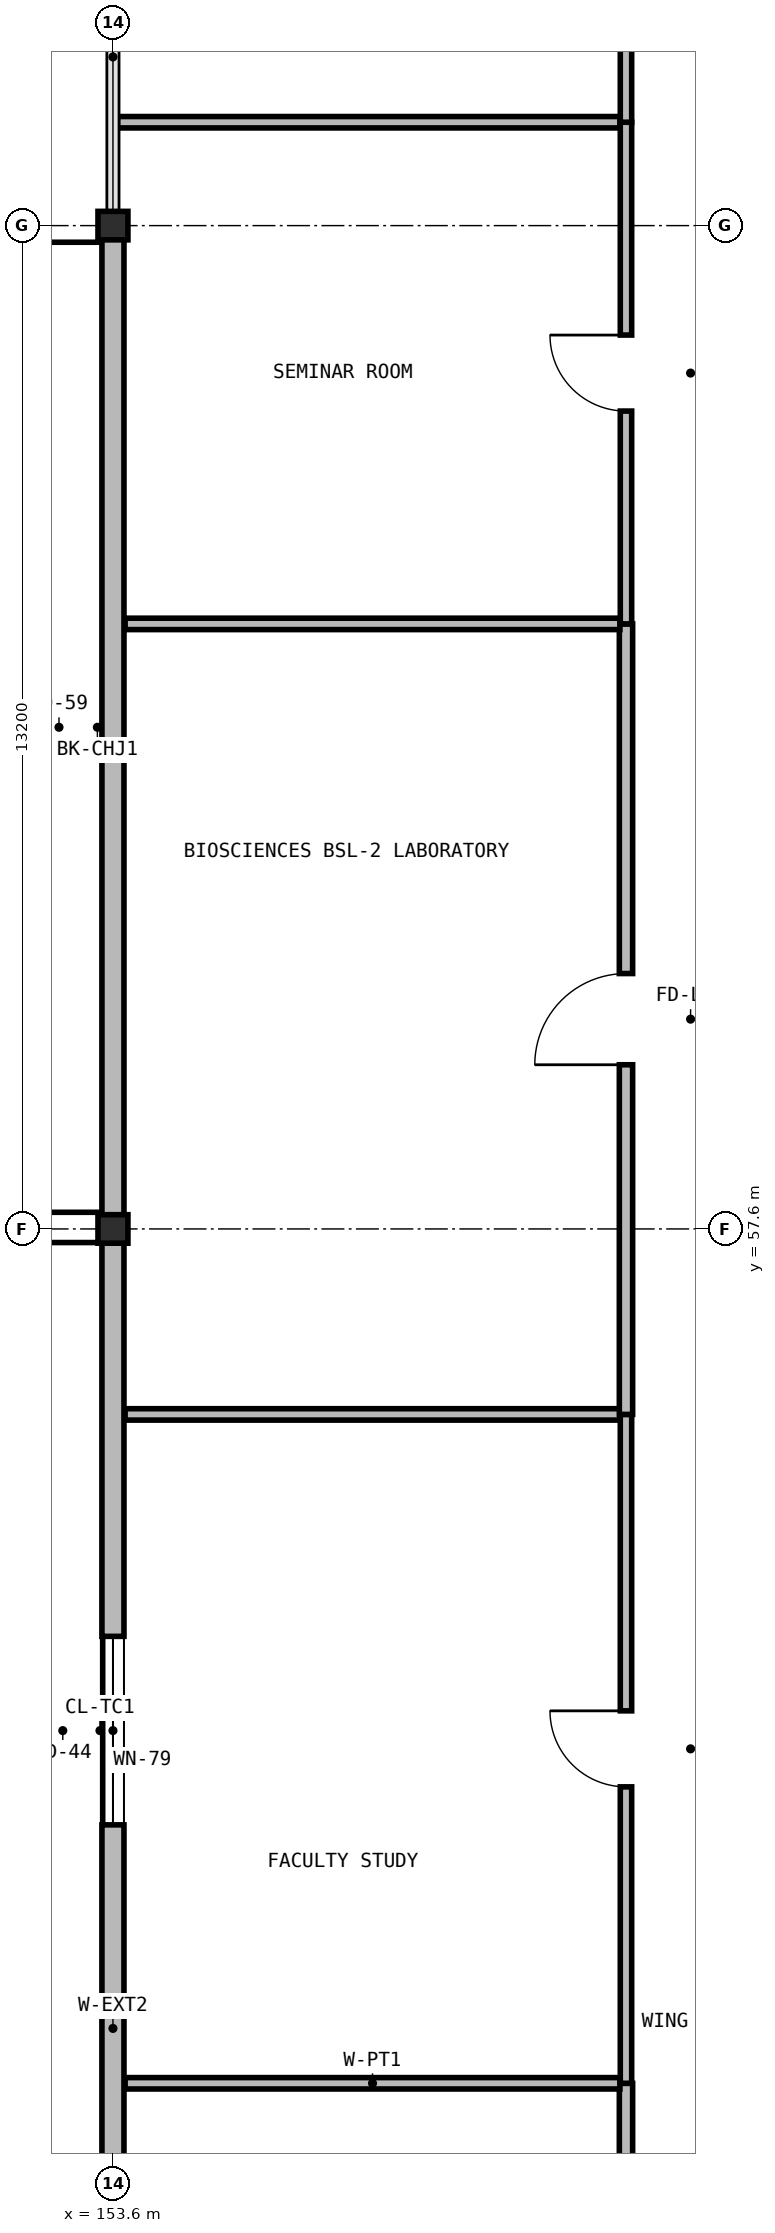
"""IFC4 building model, lengths in metres.
Left out: names, types, materials, properties, quantities, classifications, styles, units other than length and angle.
Written with IfcOpenShell. Run it as: python <this file> out.ifc"""

import sys

from ifc_helpers import new_model, si_unit, direction, frame, frame_2d, origin, origin_2d, place, context, subcontext, project, spatial, rectangle, i_section, extrude, element, fill, save


model = new_model("IFC4")
c1 = context("Model", 3, precision=1e-05, world=origin(), true_north=direction((0.0, 1.0)))
c2 = subcontext(c1, "Body", "Model", "MODEL_VIEW")
j1 = project(units=[si_unit("LENGTHUNIT", "METRE"), si_unit("PLANEANGLEUNIT", "RADIAN")], contexts=[c1])
p1 = place(None, origin())
s1 = spatial("IfcSite", under=j1, at=p1, CompositionType="ELEMENT")
p2 = place(p1, origin())
s2 = spatial("IfcBuilding", under=s1, at=p2, CompositionType="ELEMENT")
p3 = place(p2, frame((0.0, 0.0, 14.35)))
s3 = spatial("IfcBuildingStorey", under=s2, at=p3, CompositionType="ELEMENT", Elevation=14.35)
for number, where, z_axis, x_axis in (
    (1, (153.6, 57.6, 0.0), (0.0, 0.0, 1.0), (1.0, 0.0, 0.0)),
    (2, (153.6, 70.8, 0.0), (0.0, 0.0, 1.0), (1.0, 0.0, 0.0)),
):
    element("IfcColumn", number, at=place(p3, frame(where, z_axis=z_axis, x_axis=x_axis)), inside=s3, PredefinedType="COLUMN", context=c2, shape_type="SweptSolid", body=[
        extrude(i_section(OverallWidth=0.394, OverallDepth=0.375, WebThickness=0.02, FlangeThickness=0.032, at=origin_2d()), origin(), (0.0, 0.0, 1.0), 4.55),
    ])
p4 = place(p3, frame((153.6, 44.404, 0.0), z_axis=(0.0, 0.0, 1.0), x_axis=(0.0, 1.0, 0.0)))
e3 = element("IfcWall", 3, at=p4, inside=s3, PredefinedType="SOLIDWALL", context=c2, shape_type="SweptSolid", body=[
    extrude(rectangle(XDim=13.192, YDim=0.29, at=frame_2d((6.596, 0.0))), origin(), (0.0, 0.0, 1.0), 3.742),
])
p5 = place(p4, frame((5.356, 0.0, 0.95)))
e4 = element("IfcOpeningElement", 4, at=p5, cuts=e3, PredefinedType="OPENING", context=c2, shape_type="SweptSolid", body=[
    extrude(rectangle(XDim=2.48, YDim=1.4, at=frame_2d((1.24, 0.7))), frame((0.0, 0.155, 0.0), z_axis=(0.0, -1.0, 0.0), x_axis=(1.0, 0.0, 0.0)), (0.0, 0.0, 1.0), 0.31),
])
p6 = place(p3, frame((153.6, 57.604, 0.0), z_axis=(0.0, 0.0, 1.0), x_axis=(0.0, 1.0, 0.0)))
e5 = element("IfcWall", 5, at=p6, inside=s3, PredefinedType="SOLIDWALL", context=c2, shape_type="SweptSolid", body=[
    extrude(rectangle(XDim=13.192, YDim=0.29, at=frame_2d((6.596, 0.0))), origin(), (0.0, 0.0, 1.0), 3.742),
])
p7 = place(p3, frame((160.35, 39.16, 0.0), z_axis=(0.0, 0.0, 1.0), x_axis=(0.0, 1.0, 0.0)))
e6 = element("IfcWall", 6, at=p7, inside=s3, PredefinedType="PARTITIONING", context=c2, shape_type="SweptSolid", body=[
    extrude(rectangle(XDim=7.2, YDim=0.175, at=frame_2d((3.6, 0.0))), origin(), (0.0, 0.0, 1.0), 4.3),
])
p8 = place(p7, frame((3.0, 0.0, 0.0)))
e7 = element("IfcOpeningElement", 7, at=p8, cuts=e6, PredefinedType="OPENING", context=c2, shape_type="SweptSolid", body=[
    extrude(rectangle(XDim=1.2, YDim=2.2, at=frame_2d((0.6, 1.1))), frame((0.0, 0.097, 0.0), z_axis=(0.0, -1.0, 0.0), x_axis=(1.0, 0.0, 0.0)), (0.0, 0.0, 1.0), 0.195),
])
p9 = place(p3, frame((153.76, 46.36, 0.0), z_axis=(0.0, 0.0, 1.0), x_axis=(1.0, 0.0, 0.0)))
e8 = element("IfcWall", 8, at=p9, inside=s3, PredefinedType="PARTITIONING", context=c2, shape_type="SweptSolid", body=[
    extrude(rectangle(XDim=6.51, YDim=0.15, at=frame_2d((3.255, 0.0))), origin(), (0.0, 0.0, 1.0), 4.3),
])
p10 = place(p3, frame((160.35, 46.36, 0.0), z_axis=(0.0, 0.0, 1.0), x_axis=(0.0, 1.0, 0.0)))
e9 = element("IfcWall", 9, at=p10, inside=s3, PredefinedType="PARTITIONING", context=c2, shape_type="SweptSolid", body=[
    extrude(rectangle(XDim=8.8, YDim=0.15, at=frame_2d((4.4, 0.0))), origin(), (0.0, 0.0, 1.0), 4.3),
])
p11 = place(p10, frame((3.9, 0.0, 0.0)))
e10 = element("IfcOpeningElement", 10, at=p11, cuts=e9, PredefinedType="OPENING", context=c2, shape_type="SweptSolid", body=[
    extrude(rectangle(XDim=1.0, YDim=2.2, at=frame_2d((0.5, 1.1))), frame((0.0, 0.085, 0.0), z_axis=(0.0, -1.0, 0.0), x_axis=(1.0, 0.0, 0.0)), (0.0, 0.0, 1.0), 0.17),
])
p12 = place(p3, frame((153.76, 55.16, 0.0), z_axis=(0.0, 0.0, 1.0), x_axis=(1.0, 0.0, 0.0)))
e11 = element("IfcWall", 11, at=p12, inside=s3, PredefinedType="PARTITIONING", context=c2, shape_type="SweptSolid", body=[
    extrude(rectangle(XDim=6.51, YDim=0.15, at=frame_2d((3.255, 0.0))), origin(), (0.0, 0.0, 1.0), 4.3),
])
p13 = place(p3, frame((160.35, 55.16, 0.0), z_axis=(0.0, 0.0, 1.0), x_axis=(0.0, 1.0, 0.0)))
e12 = element("IfcWall", 12, at=p13, inside=s3, PredefinedType="PARTITIONING", context=c2, shape_type="SweptSolid", body=[
    extrude(rectangle(XDim=10.4, YDim=0.175, at=frame_2d((5.2, 0.0))), origin(), (0.0, 0.0, 1.0), 4.3),
])
p14 = place(p13, frame((4.6, 0.0, 0.0)))
e13 = element("IfcOpeningElement", 13, at=p14, cuts=e12, PredefinedType="OPENING", context=c2, shape_type="SweptSolid", body=[
    extrude(rectangle(XDim=1.2, YDim=2.2, at=frame_2d((0.6, 1.1))), frame((0.0, 0.097, 0.0), z_axis=(0.0, -1.0, 0.0), x_axis=(1.0, 0.0, 0.0)), (0.0, 0.0, 1.0), 0.195),
])
p15 = place(p3, frame((153.76, 65.56, 0.0), z_axis=(0.0, 0.0, 1.0), x_axis=(1.0, 0.0, 0.0)))
e14 = element("IfcWall", 14, at=p15, inside=s3, PredefinedType="PARTITIONING", context=c2, shape_type="SweptSolid", body=[
    extrude(rectangle(XDim=6.51, YDim=0.15, at=frame_2d((3.255, 0.0))), origin(), (0.0, 0.0, 1.0), 4.3),
])
p16 = place(p3, frame((160.35, 65.56, 0.0), z_axis=(0.0, 0.0, 1.0), x_axis=(0.0, 1.0, 0.0)))
e15 = element("IfcWall", 15, at=p16, inside=s3, PredefinedType="PARTITIONING", context=c2, shape_type="SweptSolid", body=[
    extrude(rectangle(XDim=6.6, YDim=0.15, at=frame_2d((3.3, 0.0))), origin(), (0.0, 0.0, 1.0), 4.3),
])
p17 = place(p16, frame((2.8, 0.0, 0.0)))
e16 = element("IfcOpeningElement", 16, at=p17, cuts=e15, PredefinedType="OPENING", context=c2, shape_type="SweptSolid", body=[
    extrude(rectangle(XDim=1.0, YDim=2.2, at=frame_2d((0.5, 1.1))), frame((0.0, 0.085, 0.0), z_axis=(0.0, -1.0, 0.0), x_axis=(1.0, 0.0, 0.0)), (0.0, 0.0, 1.0), 0.17),
])
p18 = place(p3, frame((153.66, 72.16, 0.0), z_axis=(0.0, 0.0, 1.0), x_axis=(1.0, 0.0, 0.0)))
e17 = element("IfcWall", 17, at=p18, inside=s3, PredefinedType="PARTITIONING", context=c2, shape_type="SweptSolid", body=[
    extrude(rectangle(XDim=6.61, YDim=0.15, at=frame_2d((3.305, 0.0))), origin(), (0.0, 0.0, 1.0), 4.3),
])
p19 = place(p3, frame((160.35, 72.16, 0.0), z_axis=(0.0, 0.0, 1.0), x_axis=(0.0, 1.0, 0.0)))
e18 = element("IfcWall", 18, at=p19, inside=s3, PredefinedType="PARTITIONING", context=c2, shape_type="SweptSolid", body=[
    extrude(rectangle(XDim=7.2, YDim=0.15, at=frame_2d((3.6, 0.0))), origin(), (0.0, 0.0, 1.0), 4.3),
])
p20 = place(p19, frame((3.1, 0.0, 0.0)))
e19 = element("IfcOpeningElement", 19, at=p20, cuts=e18, PredefinedType="OPENING", context=c2, shape_type="SweptSolid", body=[
    extrude(rectangle(XDim=1.0, YDim=2.2, at=frame_2d((0.5, 1.1))), frame((0.0, 0.085, 0.0), z_axis=(0.0, -1.0, 0.0), x_axis=(1.0, 0.0, 0.0)), (0.0, 0.0, 1.0), 0.17),
])
p21 = place(p5, origin())
e20 = element("IfcWindow", 20, at=p21, inside=s3, PartitioningType="SINGLE_PANEL", PredefinedType="WINDOW", context=c2, shape_type="SweptSolid", body=[
    extrude(rectangle(XDim=2.48, YDim=1.4, at=frame_2d((1.24, 0.7))), frame((0.0, 0.03, 0.0), z_axis=(0.0, -1.0, 0.0), x_axis=(1.0, 0.0, 0.0)), (0.0, 0.0, 1.0), 0.06),
])
fill(e4, e20)
p22 = place(p11, origin())
e21 = element("IfcDoor", 21, at=p22, inside=s3, OperationType="SINGLE_SWING_RIGHT", PredefinedType="DOOR", context=c2, shape_type="SweptSolid", body=[
    extrude(rectangle(XDim=1.0, YDim=2.2, at=frame_2d((0.5, 1.1))), frame((0.0, 0.025, 0.0), z_axis=(0.0, -1.0, 0.0), x_axis=(1.0, 0.0, 0.0)), (0.0, 0.0, 1.0), 0.05),
])
fill(e10, e21)
p23 = place(p14, origin())
e22 = element("IfcDoor", 22, at=p23, inside=s3, OperationType="SINGLE_SWING_LEFT", PredefinedType="DOOR", context=c2, shape_type="SweptSolid", body=[
    extrude(rectangle(XDim=1.2, YDim=2.2, at=frame_2d((0.6, 1.1))), frame((0.0, 0.025, 0.0), z_axis=(0.0, -1.0, 0.0), x_axis=(1.0, 0.0, 0.0)), (0.0, 0.0, 1.0), 0.05),
])
fill(e13, e22)
p24 = place(p17, origin())
e23 = element("IfcDoor", 23, at=p24, inside=s3, OperationType="SINGLE_SWING_RIGHT", PredefinedType="DOOR", context=c2, shape_type="SweptSolid", body=[
    extrude(rectangle(XDim=1.0, YDim=2.2, at=frame_2d((0.5, 1.1))), frame((0.0, 0.025, 0.0), z_axis=(0.0, -1.0, 0.0), x_axis=(1.0, 0.0, 0.0)), (0.0, 0.0, 1.0), 0.05),
])
fill(e16, e23)
save(model, sys.argv[1])
